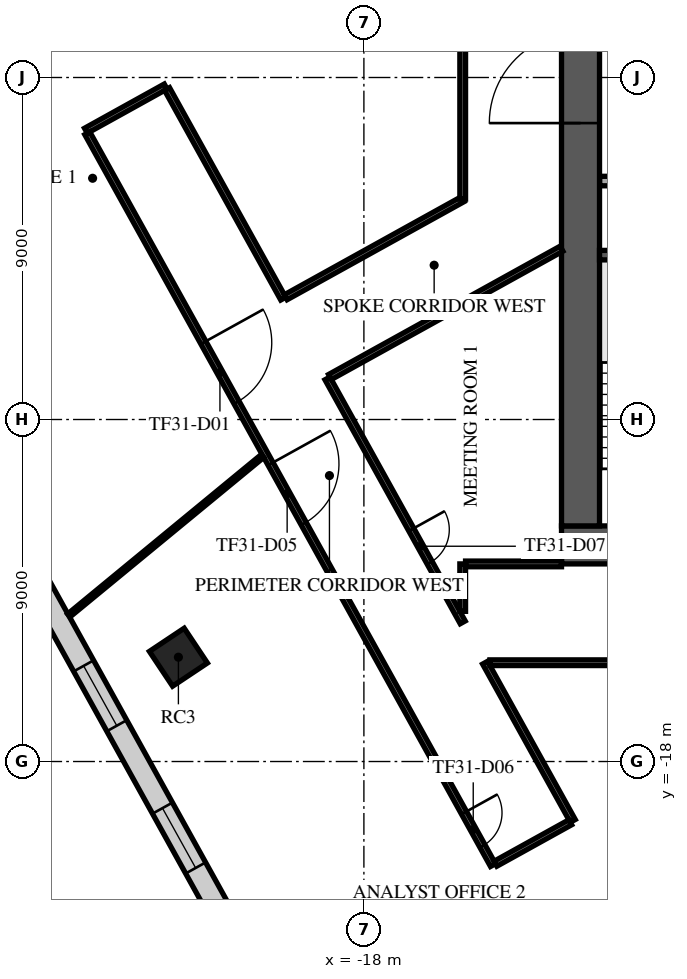
"""IFC4 building model, lengths in metres.
Left out: names, types, materials, properties, quantities, classifications, styles, units other than length and angle.
Written with IfcOpenShell. Run it as: python <this file> out.ifc"""

import sys

from ifc_helpers import new_model, si_unit, direction, frame, frame_2d, origin, origin_2d, place, context, subcontext, project, spatial, rectangle, extrude, element, fill, save


model = new_model("IFC4")
c1 = context("Model", 3, precision=1e-05, world=origin(), true_north=direction((0.0, 1.0)))
c2 = subcontext(c1, "Body", "Model", "MODEL_VIEW")
j1 = project(units=[si_unit("LENGTHUNIT", "METRE"), si_unit("PLANEANGLEUNIT", "RADIAN")], contexts=[c1])
p1 = place(None, origin())
s1 = spatial("IfcSite", under=j1, at=p1, CompositionType="ELEMENT")
p2 = place(p1, origin())
s2 = spatial("IfcBuilding", under=s1, at=p2, CompositionType="ELEMENT")
p3 = place(p2, frame((0.0, 0.0, 135.7)))
s3 = spatial("IfcBuildingStorey", under=s2, at=p3, CompositionType="ELEMENT", Elevation=135.7)
p4 = place(p3, frame((-22.881, -15.255, -0.4), z_axis=(0.0, 0.0, 1.0), x_axis=(0.832028680356, 0.55473261583, 0.0)))
e1 = element("IfcColumn", 1, at=p4, inside=s3, PredefinedType="COLUMN", context=c2, shape_type="SweptSolid", body=[
    extrude(rectangle(XDim=1.1, YDim=1.1, at=origin_2d()), origin(), (0.0, 0.0, 1.0), 4.4),
])
p5 = place(p3, frame((-12.8, -12.3, 0.0), z_axis=(0.0, 0.0, 1.0), x_axis=(1.0, 0.0, 0.0)))
e2 = element("IfcWall", 2, at=p5, inside=s3, PredefinedType="SHEAR", context=c2, shape_type="SweptSolid", body=[
    extrude(rectangle(XDim=25.6, YDim=1.0, at=frame_2d((12.8, 0.0))), origin(), (0.0, 0.0, 1.0), 3.6),
])
p6 = place(p5, frame((7.7, 0.0, 0.0)))
e3 = element("IfcOpeningElement", 3, at=p6, cuts=e2, PredefinedType="OPENING", context=c2, shape_type="SweptSolid", body=[
    extrude(rectangle(XDim=2.0, YDim=2.1, at=frame_2d((1.0, 1.05))), frame((0.0, 0.51, 0.0), z_axis=(0.0, -1.0, 0.0), x_axis=(1.0, 0.0, 0.0)), (0.0, 0.0, 1.0), 1.02),
])
p7 = place(p5, frame((17.825, 0.0, 0.0)))
e4 = element("IfcOpeningElement", 4, at=p7, cuts=e2, PredefinedType="OPENING", context=c2, shape_type="SweptSolid", body=[
    extrude(rectangle(XDim=1.2, YDim=2.1, at=frame_2d((0.6, 1.05))), frame((0.0, 0.51, 0.0), z_axis=(0.0, -1.0, 0.0), x_axis=(1.0, 0.0, 0.0)), (0.0, 0.0, 1.0), 1.02),
])
p8 = place(p5, frame((1.975, 0.0, 0.0)))
e5 = element("IfcOpeningElement", 5, at=p8, cuts=e2, PredefinedType="OPENING", context=c2, shape_type="SweptSolid", body=[
    extrude(rectangle(XDim=1.2, YDim=2.1, at=frame_2d((0.6, 1.05))), frame((0.0, 0.51, 0.0), z_axis=(0.0, -1.0, 0.0), x_axis=(1.0, 0.0, 0.0)), (0.0, 0.0, 1.0), 1.02),
])
p9 = place(p5, frame((22.425, 0.0, 0.0)))
e6 = element("IfcOpeningElement", 6, at=p9, cuts=e2, PredefinedType="OPENING", context=c2, shape_type="SweptSolid", body=[
    extrude(rectangle(XDim=1.2, YDim=2.1, at=frame_2d((0.6, 1.05))), frame((0.0, 0.51, 0.0), z_axis=(0.0, -1.0, 0.0), x_axis=(1.0, 0.0, 0.0)), (0.0, 0.0, 1.0), 1.02),
])
p10 = place(p3, frame((-12.3, -11.8, 0.0), z_axis=(0.0, 0.0, 1.0), x_axis=(0.0, 1.0, 0.0)))
e7 = element("IfcWall", 7, at=p10, inside=s3, PredefinedType="SHEAR", context=c2, shape_type="SweptSolid", body=[
    extrude(rectangle(XDim=23.6, YDim=1.0, at=frame_2d((11.8, 0.0))), origin(), (0.0, 0.0, 1.0), 3.6),
])
p11 = place(p10, frame((10.6, 0.0, 0.0)))
e8 = element("IfcOpeningElement", 8, at=p11, cuts=e7, PredefinedType="OPENING", context=c2, shape_type="SweptSolid", body=[
    extrude(rectangle(XDim=2.4, YDim=2.4, at=frame_2d((1.2, 1.2))), frame((0.0, 0.51, 0.0), z_axis=(0.0, -1.0, 0.0), x_axis=(1.0, 0.0, 0.0)), (0.0, 0.0, 1.0), 1.02),
])
p12 = place(p3, frame((-8.65, -4.675, 0.0), z_axis=(0.0, 0.0, 1.0), x_axis=(-1.0, 0.0, 0.0)))
e9 = element("IfcWall", 9, at=p12, inside=s3, PredefinedType="SOLIDWALL", context=c2, shape_type="SweptSolid", body=[
    extrude(rectangle(XDim=3.15, YDim=0.25, at=frame_2d((1.575, 0.0))), origin(), (0.0, 0.0, 1.0), 3.6),
])
p13 = place(p3, frame((-11.795, -2.725, 0.0), z_axis=(0.0, 0.0, 1.0), x_axis=(1.0, 0.0, 0.0)))
e10 = element("IfcWall", 10, at=p13, inside=s3, PredefinedType="PARTITIONING", context=c2, shape_type="SweptSolid", body=[
    extrude(rectangle(XDim=8.915, YDim=0.25, at=frame_2d((4.458, 0.0))), origin(), (0.0, 0.0, 1.0), 3.6),
])
p14 = place(p13, frame((1.295, 0.0, 0.0)))
e11 = element("IfcOpeningElement", 11, at=p14, cuts=e10, PredefinedType="OPENING", context=c2, shape_type="SweptSolid", body=[
    extrude(rectangle(XDim=1.0, YDim=2.1, at=frame_2d((0.5, 1.05))), frame((0.0, 0.135, 0.0), z_axis=(0.0, -1.0, 0.0), x_axis=(1.0, 0.0, 0.0)), (0.0, 0.0, 1.0), 0.27),
])
p15 = place(p13, frame((4.42, 0.0, 0.0)))
e12 = element("IfcOpeningElement", 12, at=p15, cuts=e10, PredefinedType="OPENING", context=c2, shape_type="SweptSolid", body=[
    extrude(rectangle(XDim=1.0, YDim=2.1, at=frame_2d((0.5, 1.05))), frame((0.0, 0.135, 0.0), z_axis=(0.0, -1.0, 0.0), x_axis=(1.0, 0.0, 0.0)), (0.0, 0.0, 1.0), 0.27),
])
p16 = place(p3, frame((-36.291, 4.209, 0.0), z_axis=(0.0, 0.0, 1.0), x_axis=(0.484810659622, -0.874619131003, 0.0)))
e13 = element("IfcWall", 13, at=p16, inside=s3, PredefinedType="STANDARD", context=c2, shape_type="SweptSolid", body=[
    extrude(rectangle(XDim=42.552, YDim=0.6, at=frame_2d((21.276, 0.0))), origin(), (0.0, 0.0, 1.0), 3.6),
])
p17 = place(p16, frame((1.178, 0.0, 0.9)))
e14 = element("IfcOpeningElement", 14, at=p17, cuts=e13, PredefinedType="OPENING", context=c2, shape_type="SweptSolid", body=[
    extrude(rectangle(XDim=1.8, YDim=2.1, at=frame_2d((0.9, 1.05))), frame((0.0, 0.31, 0.0), z_axis=(0.0, -1.0, 0.0), x_axis=(1.0, 0.0, 0.0)), (0.0, 0.0, 1.0), 0.62),
])
p18 = place(p16, frame((5.396, 0.0, 0.9)))
e15 = element("IfcOpeningElement", 15, at=p18, cuts=e13, PredefinedType="OPENING", context=c2, shape_type="SweptSolid", body=[
    extrude(rectangle(XDim=1.8, YDim=2.1, at=frame_2d((0.9, 1.05))), frame((0.0, 0.31, 0.0), z_axis=(0.0, -1.0, 0.0), x_axis=(1.0, 0.0, 0.0)), (0.0, 0.0, 1.0), 0.62),
])
p19 = place(p16, frame((13.956, 0.0, 0.9)))
e16 = element("IfcOpeningElement", 16, at=p19, cuts=e13, PredefinedType="OPENING", context=c2, shape_type="SweptSolid", body=[
    extrude(rectangle(XDim=1.8, YDim=2.1, at=frame_2d((0.9, 1.05))), frame((0.0, 0.31, 0.0), z_axis=(0.0, -1.0, 0.0), x_axis=(1.0, 0.0, 0.0)), (0.0, 0.0, 1.0), 0.62),
])
p20 = place(p16, frame((18.236, 0.0, 0.9)))
e17 = element("IfcOpeningElement", 17, at=p20, cuts=e13, PredefinedType="OPENING", context=c2, shape_type="SweptSolid", body=[
    extrude(rectangle(XDim=1.8, YDim=2.1, at=frame_2d((0.9, 1.05))), frame((0.0, 0.31, 0.0), z_axis=(0.0, -1.0, 0.0), x_axis=(1.0, 0.0, 0.0)), (0.0, 0.0, 1.0), 0.62),
])
p21 = place(p16, frame((22.516, 0.0, 0.9)))
e18 = element("IfcOpeningElement", 18, at=p21, cuts=e13, PredefinedType="OPENING", context=c2, shape_type="SweptSolid", body=[
    extrude(rectangle(XDim=1.8, YDim=2.1, at=frame_2d((0.9, 1.05))), frame((0.0, 0.31, 0.0), z_axis=(0.0, -1.0, 0.0), x_axis=(1.0, 0.0, 0.0)), (0.0, 0.0, 1.0), 0.62),
])
p22 = place(p16, frame((26.796, 0.0, 0.9)))
e19 = element("IfcOpeningElement", 19, at=p22, cuts=e13, PredefinedType="OPENING", context=c2, shape_type="SweptSolid", body=[
    extrude(rectangle(XDim=1.8, YDim=2.1, at=frame_2d((0.9, 1.05))), frame((0.0, 0.31, 0.0), z_axis=(0.0, -1.0, 0.0), x_axis=(1.0, 0.0, 0.0)), (0.0, 0.0, 1.0), 0.62),
])
p23 = place(p16, frame((31.076, 0.0, 0.9)))
e20 = element("IfcOpeningElement", 20, at=p23, cuts=e13, PredefinedType="OPENING", context=c2, shape_type="SweptSolid", body=[
    extrude(rectangle(XDim=1.8, YDim=2.1, at=frame_2d((0.9, 1.05))), frame((0.0, 0.31, 0.0), z_axis=(0.0, -1.0, 0.0), x_axis=(1.0, 0.0, 0.0)), (0.0, 0.0, 1.0), 0.62),
])
p24 = place(p16, frame((35.356, 0.0, 0.9)))
e21 = element("IfcOpeningElement", 21, at=p24, cuts=e13, PredefinedType="OPENING", context=c2, shape_type="SweptSolid", body=[
    extrude(rectangle(XDim=1.8, YDim=2.1, at=frame_2d((0.9, 1.05))), frame((0.0, 0.31, 0.0), z_axis=(0.0, -1.0, 0.0), x_axis=(1.0, 0.0, 0.0)), (0.0, 0.0, 1.0), 0.62),
])
p25 = place(p16, frame((39.573, 0.0, 0.9)))
e22 = element("IfcOpeningElement", 22, at=p25, cuts=e13, PredefinedType="OPENING", context=c2, shape_type="SweptSolid", body=[
    extrude(rectangle(XDim=1.8, YDim=2.1, at=frame_2d((0.9, 1.05))), frame((0.0, 0.31, 0.0), z_axis=(0.0, -1.0, 0.0), x_axis=(1.0, 0.0, 0.0)), (0.0, 0.0, 1.0), 0.62),
])
p26 = place(p3, frame((-25.315, -1.401, 0.0), z_axis=(0.0, 0.0, 1.0), x_axis=(0.874550463112, 0.484934518745, 0.0)))
e23 = element("IfcWall", 23, at=p26, inside=s3, PredefinedType="PARTITIONING", context=c2, shape_type="SweptSolid", body=[
    extrude(rectangle(XDim=2.4, YDim=0.15, at=frame_2d((1.2, 0.0))), origin(), (0.0, 0.0, 1.0), 3.15),
])
p27 = place(p3, frame((-25.279, -1.467, 0.0), z_axis=(0.0, 0.0, 1.0), x_axis=(0.484803020703, -0.874623365294, 0.0)))
e24 = element("IfcWall", 24, at=p27, inside=s3, PredefinedType="PARTITIONING", context=c2, shape_type="SweptSolid", body=[
    extrude(rectangle(XDim=22.02, YDim=0.15, at=frame_2d((11.01, 0.0))), origin(), (0.0, 0.0, 1.0), 3.15),
])
p28 = place(p27, frame((6.3, 0.0, 0.0)))
e25 = element("IfcOpeningElement", 25, at=p28, cuts=e24, PredefinedType="OPENING", context=c2, shape_type="SweptSolid", body=[
    extrude(rectangle(XDim=1.8, YDim=2.1, at=frame_2d((0.9, 1.05))), frame((0.0, 0.085, 0.0), z_axis=(0.0, -1.0, 0.0), x_axis=(1.0, 0.0, 0.0)), (0.0, 0.0, 1.0), 0.17),
])
p29 = place(p27, frame((9.948, 0.0, 0.0)))
e26 = element("IfcOpeningElement", 26, at=p29, cuts=e24, PredefinedType="OPENING", context=c2, shape_type="SweptSolid", body=[
    extrude(rectangle(XDim=1.8, YDim=2.1, at=frame_2d((0.9, 1.05))), frame((0.0, 0.085, 0.0), z_axis=(0.0, -1.0, 0.0), x_axis=(1.0, 0.0, 0.0)), (0.0, 0.0, 1.0), 0.17),
])
p30 = place(p27, frame((20.448, 0.0, 0.0)))
e27 = element("IfcOpeningElement", 27, at=p30, cuts=e24, PredefinedType="OPENING", context=c2, shape_type="SweptSolid", body=[
    extrude(rectangle(XDim=1.0, YDim=2.1, at=frame_2d((0.5, 1.05))), frame((0.0, 0.085, 0.0), z_axis=(0.0, -1.0, 0.0), x_axis=(1.0, 0.0, 0.0)), (0.0, 0.0, 1.0), 0.17),
])
p31 = place(p3, frame((-23.18, -0.302, 0.0), z_axis=(0.0, 0.0, 1.0), x_axis=(0.48477505554, -0.874638865776, 0.0)))
e28 = element("IfcWall", 28, at=p31, inside=s3, PredefinedType="PARTITIONING", context=c2, shape_type="SweptSolid", body=[
    extrude(rectangle(XDim=6.307, YDim=0.15, at=frame_2d((3.154, 0.0))), origin(), (0.0, 0.0, 1.0), 3.15),
])
p32 = place(p3, frame((-20.056, -5.783, 0.0), z_axis=(0.0, 0.0, 1.0), x_axis=(0.874645694613, 0.484762734638, 0.0)))
e29 = element("IfcWall", 29, at=p32, inside=s3, PredefinedType="PARTITIONING", context=c2, shape_type="SweptSolid", body=[
    extrude(rectangle(XDim=5.324, YDim=0.15, at=frame_2d((2.662, 0.0))), origin(), (0.0, 0.0, 1.0), 3.15),
])
p33 = place(p3, frame((-18.959, -7.918, 0.0), z_axis=(0.0, 0.0, 1.0), x_axis=(0.484857684507, -0.874593062958, 0.0)))
e30 = element("IfcWall", 30, at=p33, inside=s3, PredefinedType="PARTITIONING", context=c2, shape_type="SweptSolid", body=[
    extrude(rectangle(XDim=7.341, YDim=0.15, at=frame_2d((3.67, 0.0))), origin(), (0.0, 0.0, 1.0), 3.15),
])
p34 = place(p33, frame((4.55, 0.0, 0.0)))
e31 = element("IfcOpeningElement", 31, at=p34, cuts=e30, PredefinedType="OPENING", context=c2, shape_type="SweptSolid", body=[
    extrude(rectangle(XDim=1.0, YDim=2.1, at=frame_2d((0.5, 1.05))), frame((0.0, 0.085, 0.0), z_axis=(0.0, -1.0, 0.0), x_axis=(1.0, 0.0, 0.0)), (0.0, 0.0, 1.0), 0.17),
])
p35 = place(p3, frame((-18.893, -7.882, 0.0), z_axis=(0.0, 0.0, 1.0), x_axis=(0.874670900287, 0.484717253861, 0.0)))
e32 = element("IfcWall", 32, at=p35, inside=s3, PredefinedType="PARTITIONING", context=c2, shape_type="SweptSolid", body=[
    extrude(rectangle(XDim=6.966, YDim=0.15, at=frame_2d((3.483, 0.0))), origin(), (0.0, 0.0, 1.0), 3.15),
])
p36 = place(p3, frame((-15.4, -14.048, 0.0), z_axis=(0.0, 0.0, 1.0), x_axis=(0.0, 1.0, 0.0)))
e33 = element("IfcWall", 33, at=p36, inside=s3, PredefinedType="PARTITIONING", context=c2, shape_type="SweptSolid", body=[
    extrude(rectangle(XDim=1.248, YDim=0.15, at=frame_2d((0.624, 0.0))), origin(), (0.0, 0.0, 1.0), 3.15),
])
p37 = place(p3, frame((-15.4, -3.201, 0.0), z_axis=(0.0, 0.0, 1.0), x_axis=(0.0, 1.0, 0.0)))
e34 = element("IfcWall", 34, at=p37, inside=s3, PredefinedType="PARTITIONING", context=c2, shape_type="SweptSolid", body=[
    extrude(rectangle(XDim=13.896, YDim=0.15, at=frame_2d((6.948, 0.0))), origin(), (0.0, 0.0, 1.0), 3.15),
])
p38 = place(p37, frame((4.05, 0.0, 0.0)))
e35 = element("IfcOpeningElement", 35, at=p38, cuts=e34, PredefinedType="OPENING", context=c2, shape_type="SweptSolid", body=[
    extrude(rectangle(XDim=1.0, YDim=2.1, at=frame_2d((0.5, 1.05))), frame((0.0, 0.085, 0.0), z_axis=(0.0, -1.0, 0.0), x_axis=(1.0, 0.0, 0.0)), (0.0, 0.0, 1.0), 0.17),
])
p39 = place(p37, frame((7.546, 0.0, 0.0)))
e36 = element("IfcOpeningElement", 36, at=p39, cuts=e34, PredefinedType="OPENING", context=c2, shape_type="SweptSolid", body=[
    extrude(rectangle(XDim=1.0, YDim=2.1, at=frame_2d((0.5, 1.05))), frame((0.0, 0.085, 0.0), z_axis=(0.0, -1.0, 0.0), x_axis=(1.0, 0.0, 0.0)), (0.0, 0.0, 1.0), 0.17),
])
p40 = place(p3, frame((-15.325, -12.8, 0.0), z_axis=(0.0, 0.0, 1.0), x_axis=(1.0, 0.0, 0.0)))
e37 = element("IfcWall", 37, at=p40, inside=s3, PredefinedType="PARTITIONING", context=c2, shape_type="SweptSolid", body=[
    extrude(rectangle(XDim=2.525, YDim=0.15, at=frame_2d((1.262, 0.0))), origin(), (0.0, 0.0, 1.0), 3.03),
])
p41 = place(p3, frame((-14.811, -15.4, 0.0), z_axis=(0.0, 0.0, 1.0), x_axis=(0.484728084089, -0.874664898401, 0.0)))
e38 = element("IfcWall", 38, at=p41, inside=s3, PredefinedType="PARTITIONING", context=c2, shape_type="SweptSolid", body=[
    extrude(rectangle(XDim=4.76, YDim=0.15, at=frame_2d((2.38, 0.0))), origin(), (0.0, 0.0, 1.0), 3.15),
])
p42 = place(p3, frame((-14.684, -15.4, 0.0), z_axis=(0.0, 0.0, 1.0), x_axis=(1.0, 0.0, 0.0)))
e39 = element("IfcWall", 39, at=p42, inside=s3, PredefinedType="PARTITIONING", context=c2, shape_type="SweptSolid", body=[
    extrude(rectangle(XDim=21.596, YDim=0.15, at=frame_2d((10.798, 0.0))), origin(), (0.0, 0.0, 1.0), 3.15),
])
p43 = place(p42, frame((7.322, 0.0, 0.0)))
e40 = element("IfcOpeningElement", 40, at=p43, cuts=e39, PredefinedType="OPENING", context=c2, shape_type="SweptSolid", body=[
    extrude(rectangle(XDim=1.8, YDim=2.1, at=frame_2d((0.9, 1.05))), frame((0.0, 0.085, 0.0), z_axis=(0.0, -1.0, 0.0), x_axis=(1.0, 0.0, 0.0)), (0.0, 0.0, 1.0), 0.17),
])
p44 = place(p42, frame((15.487, 0.0, 0.0)))
e41 = element("IfcOpeningElement", 41, at=p44, cuts=e39, PredefinedType="OPENING", context=c2, shape_type="SweptSolid", body=[
    extrude(rectangle(XDim=1.0, YDim=2.1, at=frame_2d((0.5, 1.05))), frame((0.0, 0.085, 0.0), z_axis=(0.0, -1.0, 0.0), x_axis=(1.0, 0.0, 0.0)), (0.0, 0.0, 1.0), 0.17),
])
p45 = place(p3, frame((-14.537, -20.69, 0.0), z_axis=(0.0, 0.0, 1.0), x_axis=(0.874699347934, 0.48466591661, 0.0)))
e42 = element("IfcWall", 42, at=p45, inside=s3, PredefinedType="PARTITIONING", context=c2, shape_type="SweptSolid", body=[
    extrude(rectangle(XDim=2.25, YDim=0.15, at=frame_2d((1.125, 0.0))), origin(), (0.0, 0.0, 1.0), 3.15),
])
p46 = place(p3, frame((-25.765, -14.157, 0.0), z_axis=(0.0, 0.0, 1.0), x_axis=(0.772001730939, 0.635620427164, 0.0)))
e43 = element("IfcWall", 43, at=p46, inside=s3, PredefinedType="PARTITIONING", context=c2, shape_type="SweptSolid", body=[
    extrude(rectangle(XDim=6.604, YDim=0.1, at=frame_2d((3.302, 0.0))), origin(), (0.0, 0.0, 1.0), 3.15),
])
p47 = place(p11, origin())
e44 = element("IfcDoor", 44, at=p47, inside=s3, OperationType="SINGLE_SWING_LEFT", PredefinedType="DOOR", context=c2, shape_type="SweptSolid", body=[
    extrude(rectangle(XDim=2.4, YDim=2.4, at=frame_2d((1.2, 1.2))), frame((0.0, 0.025, 0.0), z_axis=(0.0, -1.0, 0.0), x_axis=(1.0, 0.0, 0.0)), (0.0, 0.0, 1.0), 0.05),
])
fill(e8, e44)
p48 = place(p21, origin())
e45 = element("IfcWindow", 45, at=p48, inside=s3, PartitioningType="SINGLE_PANEL", PredefinedType="WINDOW", context=c2, shape_type="SweptSolid", body=[
    extrude(rectangle(XDim=1.8, YDim=2.1, at=frame_2d((0.9, 1.05))), frame((0.0, 0.03, 0.0), z_axis=(0.0, -1.0, 0.0), x_axis=(1.0, 0.0, 0.0)), (0.0, 0.0, 1.0), 0.06),
])
fill(e18, e45)
p49 = place(p22, origin())
e46 = element("IfcWindow", 46, at=p49, inside=s3, PartitioningType="SINGLE_PANEL", PredefinedType="WINDOW", context=c2, shape_type="SweptSolid", body=[
    extrude(rectangle(XDim=1.8, YDim=2.1, at=frame_2d((0.9, 1.05))), frame((0.0, 0.03, 0.0), z_axis=(0.0, -1.0, 0.0), x_axis=(1.0, 0.0, 0.0)), (0.0, 0.0, 1.0), 0.06),
])
fill(e19, e46)
p50 = place(p28, frame((1.8, 0.0, 0.0), z_axis=(0.0, 0.0, 1.0), x_axis=(-1.0, 0.0, 0.0)))
e47 = element("IfcDoor", 47, at=p50, inside=s3, OperationType="DOUBLE_DOOR_SINGLE_SWING", PredefinedType="DOOR", context=c2, shape_type="SweptSolid", body=[
    extrude(rectangle(XDim=1.8, YDim=2.1, at=frame_2d((0.9, 1.05))), frame((0.0, 0.025, 0.0), z_axis=(0.0, -1.0, 0.0), x_axis=(1.0, 0.0, 0.0)), (0.0, 0.0, 1.0), 0.05),
])
fill(e25, e47)
p51 = place(p29, frame((1.8, 0.0, 0.0), z_axis=(0.0, 0.0, 1.0), x_axis=(-1.0, 0.0, 0.0)))
e48 = element("IfcDoor", 48, at=p51, inside=s3, OperationType="DOUBLE_DOOR_SINGLE_SWING", PredefinedType="DOOR", context=c2, shape_type="SweptSolid", body=[
    extrude(rectangle(XDim=1.8, YDim=2.1, at=frame_2d((0.9, 1.05))), frame((0.0, 0.025, 0.0), z_axis=(0.0, -1.0, 0.0), x_axis=(1.0, 0.0, 0.0)), (0.0, 0.0, 1.0), 0.05),
])
fill(e26, e48)
p52 = place(p30, frame((1.0, 0.0, 0.0), z_axis=(0.0, 0.0, 1.0), x_axis=(-1.0, 0.0, 0.0)))
e49 = element("IfcDoor", 49, at=p52, inside=s3, OperationType="SINGLE_SWING_LEFT", PredefinedType="DOOR", context=c2, shape_type="SweptSolid", body=[
    extrude(rectangle(XDim=1.0, YDim=2.1, at=frame_2d((0.5, 1.05))), frame((0.0, 0.025, 0.0), z_axis=(0.0, -1.0, 0.0), x_axis=(1.0, 0.0, 0.0)), (0.0, 0.0, 1.0), 0.05),
])
fill(e27, e49)
p53 = place(p34, origin())
e50 = element("IfcDoor", 50, at=p53, inside=s3, OperationType="SINGLE_SWING_LEFT", PredefinedType="DOOR", context=c2, shape_type="SweptSolid", body=[
    extrude(rectangle(XDim=1.0, YDim=2.1, at=frame_2d((0.5, 1.05))), frame((0.0, 0.025, 0.0), z_axis=(0.0, -1.0, 0.0), x_axis=(1.0, 0.0, 0.0)), (0.0, 0.0, 1.0), 0.05),
])
fill(e31, e50)
save(model, sys.argv[1])
